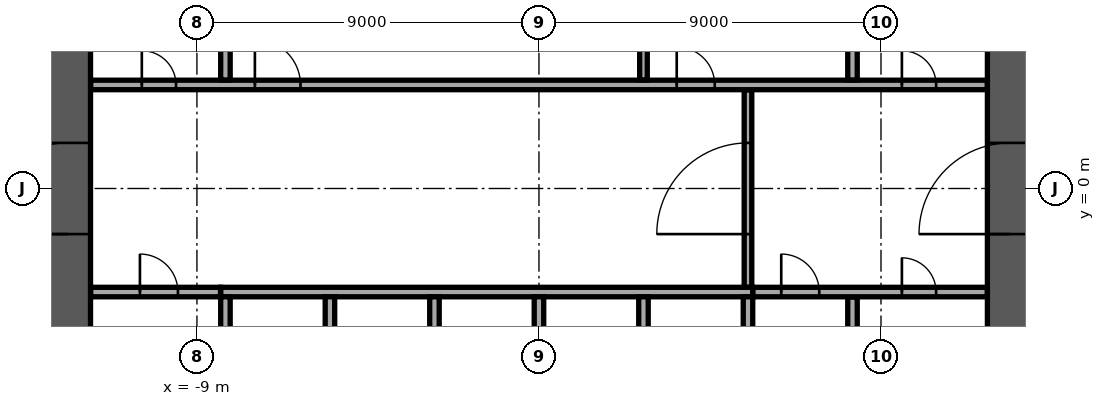
"""IFC4 building model, lengths in metres.
Left out: names, types, materials, properties, quantities, classifications, styles, units other than length and angle.
Written with IfcOpenShell. Run it as: python <this file> out.ifc"""

import sys

from ifc_helpers import new_model, si_unit, direction, frame, frame_2d, origin, place, context, subcontext, project, spatial, rectangle, extrude, element, fill, save


model = new_model("IFC4")
c1 = context("Model", 3, precision=1e-05, world=origin(), true_north=direction((0.0, 1.0)))
c2 = subcontext(c1, "Body", "Model", "MODEL_VIEW")
j1 = project(units=[si_unit("LENGTHUNIT", "METRE"), si_unit("PLANEANGLEUNIT", "RADIAN")], contexts=[c1])
p1 = place(None, origin())
s1 = spatial("IfcSite", under=j1, at=p1, CompositionType="ELEMENT")
p2 = place(p1, origin())
s2 = spatial("IfcBuilding", under=s1, at=p2, CompositionType="ELEMENT")
p3 = place(p2, frame((0.0, 0.0, 59.7)))
s3 = spatial("IfcBuildingStorey", under=s2, at=p3, CompositionType="ELEMENT", Elevation=59.7)
p4 = place(p3, frame((12.4, -11.8, 0.0), z_axis=(0.0, 0.0, 1.0), x_axis=(0.0, 1.0, 0.0)))
e1 = element("IfcWall", 1, at=p4, inside=s3, PredefinedType="SHEAR", context=c2, shape_type="SweptSolid", body=[
    extrude(rectangle(XDim=23.6, YDim=1.2, at=frame_2d((11.8, 0.0))), origin(), (0.0, 0.0, 1.0), 3.75),
])
p5 = place(p4, frame((10.6, 0.0, 0.0)))
e2 = element("IfcOpeningElement", 2, at=p5, cuts=e1, PredefinedType="OPENING", context=c2, shape_type="SweptSolid", body=[
    extrude(rectangle(XDim=2.4, YDim=2.4, at=frame_2d((1.2, 1.2))), frame((0.0, 0.61, 0.0), z_axis=(0.0, -1.0, 0.0), x_axis=(1.0, 0.0, 0.0)), (0.0, 0.0, 1.0), 1.22),
])
p6 = place(p3, frame((-12.4, -11.8, 0.0), z_axis=(0.0, 0.0, 1.0), x_axis=(0.0, 1.0, 0.0)))
e3 = element("IfcWall", 3, at=p6, inside=s3, PredefinedType="SHEAR", context=c2, shape_type="SweptSolid", body=[
    extrude(rectangle(XDim=23.6, YDim=1.2, at=frame_2d((11.8, 0.0))), origin(), (0.0, 0.0, 1.0), 3.75),
])
p7 = place(p6, frame((10.6, 0.0, 0.0)))
e4 = element("IfcOpeningElement", 4, at=p7, cuts=e3, PredefinedType="OPENING", context=c2, shape_type="SweptSolid", body=[
    extrude(rectangle(XDim=2.4, YDim=2.4, at=frame_2d((1.2, 1.2))), frame((0.0, 0.61, 0.0), z_axis=(0.0, -1.0, 0.0), x_axis=(1.0, 0.0, 0.0)), (0.0, 0.0, 1.0), 1.22),
])
p8 = place(p3, frame((-8.375, -2.725, 0.0), z_axis=(0.0, 0.0, 1.0), x_axis=(1.0, 0.0, 0.0)))
e5 = element("IfcWall", 5, at=p8, inside=s3, PredefinedType="SOLIDWALL", context=c2, shape_type="SweptSolid", body=[
    extrude(rectangle(XDim=14.0, YDim=0.25, at=frame_2d((7.0, 0.0))), origin(), (0.0, 0.0, 1.0), 3.75),
])
for number, where, z_axis, x_axis in (
    (6, (-8.25, -5.55, 0.0), (0.0, 0.0, 1.0), (0.0, 1.0, 0.0)),
    (7, (-5.5, -5.55, 0.0), (0.0, 0.0, 1.0), (0.0, 1.0, 0.0)),
    (8, (-2.75, -5.55, 0.0), (0.0, 0.0, 1.0), (0.0, 1.0, 0.0)),
    (9, (0.0, -5.55, 0.0), (0.0, 0.0, 1.0), (0.0, 1.0, 0.0)),
    (10, (2.75, -5.55, 0.0), (0.0, 0.0, 1.0), (0.0, 1.0, 0.0)),
    (11, (5.5, -5.55, 0.0), (0.0, 0.0, 1.0), (0.0, 1.0, 0.0)),
):
    element("IfcWall", number, at=place(p3, frame(where, z_axis=z_axis, x_axis=x_axis)), inside=s3, PredefinedType="SOLIDWALL", context=c2, shape_type="SweptSolid", body=[
        extrude(rectangle(XDim=2.7, YDim=0.25, at=frame_2d((1.35, 0.0))), origin(), (0.0, 0.0, 1.0), 3.75),
    ])
p9 = place(p3, frame((8.25, -5.545, 0.0), z_axis=(0.0, 0.0, 1.0), x_axis=(0.0, 1.0, 0.0)))
e12 = element("IfcWall", 12, at=p9, inside=s3, PredefinedType="PARTITIONING", context=c2, shape_type="SweptSolid", body=[
    extrude(rectangle(XDim=2.69, YDim=0.25, at=frame_2d((1.345, 0.0))), origin(), (0.0, 0.0, 1.0), 3.75),
])
p10 = place(p3, frame((-11.795, -2.725, 0.0), z_axis=(0.0, 0.0, 1.0), x_axis=(1.0, 0.0, 0.0)))
e13 = element("IfcWall", 13, at=p10, inside=s3, PredefinedType="PARTITIONING", context=c2, shape_type="SweptSolid", body=[
    extrude(rectangle(XDim=3.415, YDim=0.25, at=frame_2d((1.708, 0.0))), origin(), (0.0, 0.0, 1.0), 3.75),
])
p11 = place(p10, frame((1.295, 0.0, 0.0)))
e14 = element("IfcOpeningElement", 14, at=p11, cuts=e13, PredefinedType="OPENING", context=c2, shape_type="SweptSolid", body=[
    extrude(rectangle(XDim=1.0, YDim=2.1, at=frame_2d((0.5, 1.05))), frame((0.0, 0.135, 0.0), z_axis=(0.0, -1.0, 0.0), x_axis=(1.0, 0.0, 0.0)), (0.0, 0.0, 1.0), 0.27),
])
p12 = place(p3, frame((5.63, -2.725, 0.0), z_axis=(0.0, 0.0, 1.0), x_axis=(1.0, 0.0, 0.0)))
e15 = element("IfcWall", 15, at=p12, inside=s3, PredefinedType="PARTITIONING", context=c2, shape_type="SweptSolid", body=[
    extrude(rectangle(XDim=6.165, YDim=0.25, at=frame_2d((3.083, 0.0))), origin(), (0.0, 0.0, 1.0), 3.75),
])
p13 = place(p12, frame((0.745, 0.0, 0.0)))
e16 = element("IfcOpeningElement", 16, at=p13, cuts=e15, PredefinedType="OPENING", context=c2, shape_type="SweptSolid", body=[
    extrude(rectangle(XDim=1.0, YDim=2.1, at=frame_2d((0.5, 1.05))), frame((0.0, 0.135, 0.0), z_axis=(0.0, -1.0, 0.0), x_axis=(1.0, 0.0, 0.0)), (0.0, 0.0, 1.0), 0.27),
])
p14 = place(p12, frame((3.92, 0.0, 0.0)))
e17 = element("IfcOpeningElement", 17, at=p14, cuts=e15, PredefinedType="OPENING", context=c2, shape_type="SweptSolid", body=[
    extrude(rectangle(XDim=0.9, YDim=2.1, at=frame_2d((0.45, 1.05))), frame((0.0, 0.135, 0.0), z_axis=(0.0, -1.0, 0.0), x_axis=(1.0, 0.0, 0.0)), (0.0, 0.0, 1.0), 0.27),
])
p15 = place(p3, frame((5.5, -2.595, 0.0), z_axis=(0.0, 0.0, 1.0), x_axis=(0.0, 1.0, 0.0)))
e18 = element("IfcWall", 18, at=p15, inside=s3, PredefinedType="PARTITIONING", context=c2, shape_type="SweptSolid", body=[
    extrude(rectangle(XDim=5.19, YDim=0.2, at=frame_2d((2.595, 0.0))), origin(), (0.0, 0.0, 1.0), 3.75),
])
p16 = place(p15, frame((1.395, 0.0, 0.0)))
e19 = element("IfcOpeningElement", 19, at=p16, cuts=e18, PredefinedType="OPENING", context=c2, shape_type="SweptSolid", body=[
    extrude(rectangle(XDim=2.4, YDim=2.4, at=frame_2d((1.2, 1.2))), frame((0.0, 0.11, 0.0), z_axis=(0.0, -1.0, 0.0), x_axis=(1.0, 0.0, 0.0)), (0.0, 0.0, 1.0), 0.22),
])
p17 = place(p3, frame((-11.795, 2.725, 0.0), z_axis=(0.0, 0.0, 1.0), x_axis=(1.0, 0.0, 0.0)))
e20 = element("IfcWall", 20, at=p17, inside=s3, PredefinedType="PARTITIONING", context=c2, shape_type="SweptSolid", body=[
    extrude(rectangle(XDim=23.59, YDim=0.25, at=frame_2d((11.795, 0.0))), origin(), (0.0, 0.0, 1.0), 3.75),
])
p18 = place(p17, frame((21.345, 0.0, 0.0)))
e21 = element("IfcOpeningElement", 21, at=p18, cuts=e20, PredefinedType="OPENING", context=c2, shape_type="SweptSolid", body=[
    extrude(rectangle(XDim=0.9, YDim=2.1, at=frame_2d((0.45, 1.05))), frame((0.0, 0.135, 0.0), z_axis=(0.0, -1.0, 0.0), x_axis=(1.0, 0.0, 0.0)), (0.0, 0.0, 1.0), 0.27),
])
p19 = place(p17, frame((1.345, 0.0, 0.0)))
e22 = element("IfcOpeningElement", 22, at=p19, cuts=e20, PredefinedType="OPENING", context=c2, shape_type="SweptSolid", body=[
    extrude(rectangle(XDim=0.9, YDim=2.1, at=frame_2d((0.45, 1.05))), frame((0.0, 0.135, 0.0), z_axis=(0.0, -1.0, 0.0), x_axis=(1.0, 0.0, 0.0)), (0.0, 0.0, 1.0), 0.27),
])
p20 = place(p17, frame((4.32, 0.0, 0.0)))
e23 = element("IfcOpeningElement", 23, at=p20, cuts=e20, PredefinedType="OPENING", context=c2, shape_type="SweptSolid", body=[
    extrude(rectangle(XDim=1.2, YDim=2.1, at=frame_2d((0.6, 1.05))), frame((0.0, 0.135, 0.0), z_axis=(0.0, -1.0, 0.0), x_axis=(1.0, 0.0, 0.0)), (0.0, 0.0, 1.0), 0.27),
])
p21 = place(p17, frame((15.42, 0.0, 0.0)))
e24 = element("IfcOpeningElement", 24, at=p21, cuts=e20, PredefinedType="OPENING", context=c2, shape_type="SweptSolid", body=[
    extrude(rectangle(XDim=1.0, YDim=2.1, at=frame_2d((0.5, 1.05))), frame((0.0, 0.135, 0.0), z_axis=(0.0, -1.0, 0.0), x_axis=(1.0, 0.0, 0.0)), (0.0, 0.0, 1.0), 0.27),
])
p22 = place(p3, frame((-8.25, 2.855, 0.0), z_axis=(0.0, 0.0, 1.0), x_axis=(0.0, 1.0, 0.0)))
e25 = element("IfcWall", 25, at=p22, inside=s3, PredefinedType="PARTITIONING", context=c2, shape_type="SweptSolid", body=[
    extrude(rectangle(XDim=1.715, YDim=0.25, at=frame_2d((0.857, 0.0))), origin(), (0.0, 0.0, 1.0), 3.75),
])
p23 = place(p3, frame((2.75, 2.855, 0.0), z_axis=(0.0, 0.0, 1.0), x_axis=(0.0, 1.0, 0.0)))
e26 = element("IfcWall", 26, at=p23, inside=s3, PredefinedType="PARTITIONING", context=c2, shape_type="SweptSolid", body=[
    extrude(rectangle(XDim=2.69, YDim=0.2, at=frame_2d((1.345, 0.0))), origin(), (0.0, 0.0, 1.0), 3.75),
])
p24 = place(p3, frame((8.25, 2.855, 0.0), z_axis=(0.0, 0.0, 1.0), x_axis=(0.0, 1.0, 0.0)))
e27 = element("IfcWall", 27, at=p24, inside=s3, PredefinedType="PARTITIONING", context=c2, shape_type="SweptSolid", body=[
    extrude(rectangle(XDim=2.69, YDim=0.25, at=frame_2d((1.345, 0.0))), origin(), (0.0, 0.0, 1.0), 3.75),
])
p25 = place(p5, origin())
e28 = element("IfcDoor", 28, at=p25, inside=s3, OperationType="SINGLE_SWING_LEFT", PredefinedType="DOOR", context=c2, shape_type="SweptSolid", body=[
    extrude(rectangle(XDim=2.4, YDim=2.4, at=frame_2d((1.2, 1.2))), frame((0.0, 0.025, 0.0), z_axis=(0.0, -1.0, 0.0), x_axis=(1.0, 0.0, 0.0)), (0.0, 0.0, 1.0), 0.05),
])
fill(e2, e28)
p26 = place(p7, origin())
e29 = element("IfcDoor", 29, at=p26, inside=s3, OperationType="SINGLE_SWING_LEFT", PredefinedType="DOOR", context=c2, shape_type="SweptSolid", body=[
    extrude(rectangle(XDim=2.4, YDim=2.4, at=frame_2d((1.2, 1.2))), frame((0.0, 0.025, 0.0), z_axis=(0.0, -1.0, 0.0), x_axis=(1.0, 0.0, 0.0)), (0.0, 0.0, 1.0), 0.05),
])
fill(e4, e29)
p27 = place(p11, origin())
e30 = element("IfcDoor", 30, at=p27, inside=s3, OperationType="SINGLE_SWING_RIGHT", PredefinedType="DOOR", context=c2, shape_type="SweptSolid", body=[
    extrude(rectangle(XDim=1.0, YDim=2.1, at=frame_2d((0.5, 1.05))), frame((0.0, 0.025, 0.0), z_axis=(0.0, -1.0, 0.0), x_axis=(1.0, 0.0, 0.0)), (0.0, 0.0, 1.0), 0.05),
])
fill(e14, e30)
p28 = place(p13, origin())
e31 = element("IfcDoor", 31, at=p28, inside=s3, OperationType="SINGLE_SWING_RIGHT", PredefinedType="DOOR", context=c2, shape_type="SweptSolid", body=[
    extrude(rectangle(XDim=1.0, YDim=2.1, at=frame_2d((0.5, 1.05))), frame((0.0, 0.025, 0.0), z_axis=(0.0, -1.0, 0.0), x_axis=(1.0, 0.0, 0.0)), (0.0, 0.0, 1.0), 0.05),
])
fill(e16, e31)
p29 = place(p18, origin())
e32 = element("IfcDoor", 32, at=p29, inside=s3, OperationType="SINGLE_SWING_RIGHT", PredefinedType="DOOR", context=c2, shape_type="SweptSolid", body=[
    extrude(rectangle(XDim=0.9, YDim=2.1, at=frame_2d((0.45, 1.05))), frame((0.0, 0.025, 0.0), z_axis=(0.0, -1.0, 0.0), x_axis=(1.0, 0.0, 0.0)), (0.0, 0.0, 1.0), 0.05),
])
fill(e21, e32)
p30 = place(p14, origin())
e33 = element("IfcDoor", 33, at=p30, inside=s3, OperationType="SINGLE_SWING_RIGHT", PredefinedType="DOOR", context=c2, shape_type="SweptSolid", body=[
    extrude(rectangle(XDim=0.9, YDim=2.1, at=frame_2d((0.45, 1.05))), frame((0.0, 0.025, 0.0), z_axis=(0.0, -1.0, 0.0), x_axis=(1.0, 0.0, 0.0)), (0.0, 0.0, 1.0), 0.05),
])
fill(e17, e33)
p31 = place(p19, origin())
e34 = element("IfcDoor", 34, at=p31, inside=s3, OperationType="SINGLE_SWING_RIGHT", PredefinedType="DOOR", context=c2, shape_type="SweptSolid", body=[
    extrude(rectangle(XDim=0.9, YDim=2.1, at=frame_2d((0.45, 1.05))), frame((0.0, 0.025, 0.0), z_axis=(0.0, -1.0, 0.0), x_axis=(1.0, 0.0, 0.0)), (0.0, 0.0, 1.0), 0.05),
])
fill(e22, e34)
p32 = place(p20, origin())
e35 = element("IfcDoor", 35, at=p32, inside=s3, OperationType="SINGLE_SWING_LEFT", PredefinedType="DOOR", context=c2, shape_type="SweptSolid", body=[
    extrude(rectangle(XDim=1.2, YDim=2.1, at=frame_2d((0.6, 1.05))), frame((0.0, 0.025, 0.0), z_axis=(0.0, -1.0, 0.0), x_axis=(1.0, 0.0, 0.0)), (0.0, 0.0, 1.0), 0.05),
])
fill(e23, e35)
p33 = place(p21, origin())
e36 = element("IfcDoor", 36, at=p33, inside=s3, OperationType="SINGLE_SWING_RIGHT", PredefinedType="DOOR", context=c2, shape_type="SweptSolid", body=[
    extrude(rectangle(XDim=1.0, YDim=2.1, at=frame_2d((0.5, 1.05))), frame((0.0, 0.025, 0.0), z_axis=(0.0, -1.0, 0.0), x_axis=(1.0, 0.0, 0.0)), (0.0, 0.0, 1.0), 0.05),
])
fill(e24, e36)
p34 = place(p16, origin())
e37 = element("IfcDoor", 37, at=p34, inside=s3, OperationType="DOUBLE_DOOR_DOUBLE_SWING", PredefinedType="DOOR", context=c2, shape_type="SweptSolid", body=[
    extrude(rectangle(XDim=2.4, YDim=2.4, at=frame_2d((1.2, 1.2))), frame((0.0, 0.025, 0.0), z_axis=(0.0, -1.0, 0.0), x_axis=(1.0, 0.0, 0.0)), (0.0, 0.0, 1.0), 0.05),
])
fill(e19, e37)
save(model, sys.argv[1])
